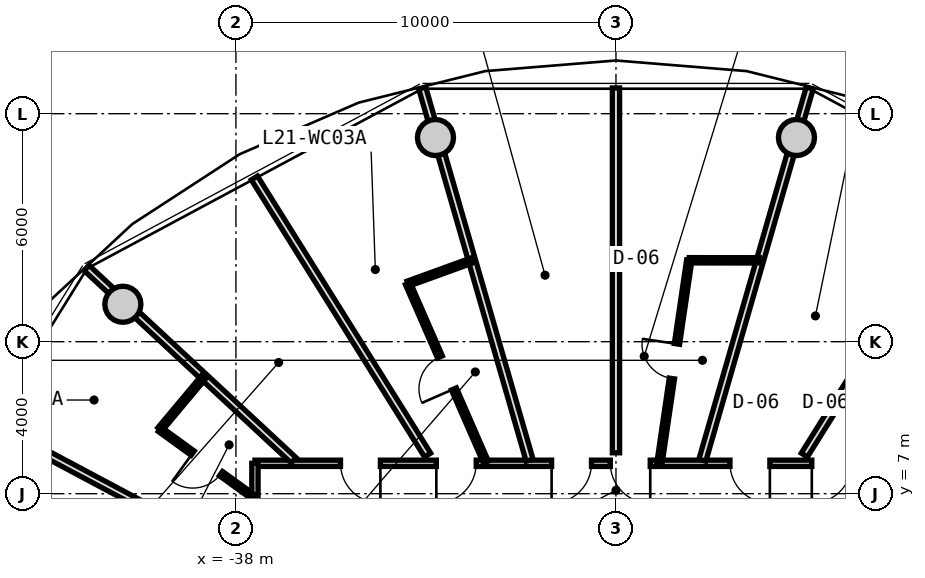
"""IFC4 building model, lengths in metres.
Left out: names, types, materials, properties, quantities, classifications, styles, units other than length and angle.
Written with IfcOpenShell. Run it as: python <this file> out.ifc"""

import sys

from ifc_helpers import new_model, si_unit, direction, frame, frame_2d, origin, origin_2d, place, context, subcontext, project, spatial, rectangle, circle, extrude, source, transform, mapped, element, fill, save


model = new_model("IFC4")
c1 = context("Model", 3, precision=1e-05, world=origin(), true_north=direction((0.0, 1.0)))
c2 = subcontext(c1, "Body", "Model", "MODEL_VIEW")
j1 = project(units=[si_unit("LENGTHUNIT", "METRE"), si_unit("PLANEANGLEUNIT", "RADIAN")], contexts=[c1])
p1 = place(None, origin())
s1 = spatial("IfcSite", under=j1, at=p1, CompositionType="ELEMENT")
p2 = place(p1, origin())
s2 = spatial("IfcBuilding", under=s1, at=p2, CompositionType="ELEMENT")
p3 = place(p2, frame((0.0, 0.0, 70.4)))
s3 = spatial("IfcBuildingStorey", under=s2, at=p3, CompositionType="ELEMENT", Elevation=70.4)
m1 = source(origin(), c2, "Body", "SweptSolid", [
    extrude(circle(Radius=0.475, at=origin_2d()), origin(), (0.0, 0.0, 1.0), 3.05),
])
for number, where, z_axis, x_axis in (
    (1, (-23.251, 16.373, 0.0), (0.0, 0.0, 1.0), (1.0, 0.0, 0.0)),
    (2, (-32.749, 16.373, 0.0), (0.0, 0.0, 1.0), (1.0, 0.0, 0.0)),
    (3, (-40.975, 11.985, 0.0), (0.0, 0.0, 1.0), (1.0, 0.0, 0.0)),
):
    element("IfcColumn", number, at=place(p3, frame(where, z_axis=z_axis, x_axis=x_axis)), inside=s3, PredefinedType="COLUMN", context=c2, shape_type="MappedRepresentation", body=[
        mapped(m1, transform((0.0, 0.0, 0.0), x_axis=(1.0, 0.0, 0.0), y_axis=(0.0, 1.0, 0.0), z_axis=(0.0, 0.0, 1.0), scale=1.0)),
    ])
m2 = source(origin(), c2, "Body", "SweptSolid", [
    extrude(rectangle(XDim=19.0, YDim=0.165, at=frame_2d((9.5, 0.0))), origin(), (0.0, 0.0, 1.0), 2.715),
])
p4 = place(p3, frame((-37.5, 7.8, 0.0), z_axis=(0.0, 0.0, 1.0), x_axis=(1.0, 0.0, 0.0)))
e4 = element("IfcWall", 4, at=p4, inside=s3, PredefinedType="PARTITIONING", context=c2, shape_type="MappedRepresentation", body=[
    mapped(m2, transform((0.0, 0.0, 0.0), x_axis=(1.0, 0.0, 0.0), y_axis=(0.0, 1.0, 0.0), z_axis=(0.0, 0.0, 1.0), scale=1.0)),
])
p5 = place(p4, frame((14.653, 0.0, 0.0)))
e5 = element("IfcOpeningElement", 5, at=p5, cuts=e4, PredefinedType="OPENING", context=c2, shape_type="SweptSolid", body=[
    extrude(rectangle(XDim=1.05, YDim=2.15, at=frame_2d((0.525, 1.075))), frame((0.0, 0.093, 0.0), z_axis=(0.0, -1.0, 0.0), x_axis=(1.0, 0.0, 0.0)), (0.0, 0.0, 1.0), 0.185),
])
p6 = place(p4, frame((12.5, 0.0, 0.0)))
e6 = element("IfcOpeningElement", 6, at=p6, cuts=e4, PredefinedType="OPENING", context=c2, shape_type="SweptSolid", body=[
    extrude(rectangle(XDim=1.05, YDim=2.15, at=frame_2d((0.525, 1.075))), frame((0.0, 0.093, 0.0), z_axis=(0.0, -1.0, 0.0), x_axis=(1.0, 0.0, 0.0)), (0.0, 0.0, 1.0), 0.185),
])
p7 = place(p4, frame((9.352, 0.0, 0.0)))
e7 = element("IfcOpeningElement", 7, at=p7, cuts=e4, PredefinedType="OPENING", context=c2, shape_type="SweptSolid", body=[
    extrude(rectangle(XDim=1.05, YDim=2.15, at=frame_2d((0.525, 1.075))), frame((0.0, 0.093, 0.0), z_axis=(0.0, -1.0, 0.0), x_axis=(1.0, 0.0, 0.0)), (0.0, 0.0, 1.0), 0.185),
])
p8 = place(p4, frame((7.806, 0.0, 0.0)))
e8 = element("IfcOpeningElement", 8, at=p8, cuts=e4, PredefinedType="OPENING", context=c2, shape_type="SweptSolid", body=[
    extrude(rectangle(XDim=1.05, YDim=2.15, at=frame_2d((0.525, 1.075))), frame((0.0, 0.093, 0.0), z_axis=(0.0, -1.0, 0.0), x_axis=(1.0, 0.0, 0.0)), (0.0, 0.0, 1.0), 0.185),
])
p9 = place(p4, frame((4.773, 0.0, 0.0)))
e9 = element("IfcOpeningElement", 9, at=p9, cuts=e4, PredefinedType="OPENING", context=c2, shape_type="SweptSolid", body=[
    extrude(rectangle(XDim=1.05, YDim=2.15, at=frame_2d((0.525, 1.075))), frame((0.0, 0.093, 0.0), z_axis=(0.0, -1.0, 0.0), x_axis=(1.0, 0.0, 0.0)), (0.0, 0.0, 1.0), 0.185),
])
p10 = place(p4, frame((2.251, 0.0, 0.0)))
e10 = element("IfcOpeningElement", 10, at=p10, cuts=e4, PredefinedType="OPENING", context=c2, shape_type="SweptSolid", body=[
    extrude(rectangle(XDim=1.05, YDim=2.15, at=frame_2d((0.525, 1.075))), frame((0.0, 0.093, 0.0), z_axis=(0.0, -1.0, 0.0), x_axis=(1.0, 0.0, 0.0)), (0.0, 0.0, 1.0), 0.185),
])
m3 = source(origin(), c2, "Body", "SweptSolid", [
    extrude(rectangle(XDim=15.6, YDim=0.165, at=frame_2d((7.8, 0.0))), origin(), (0.0, 0.0, 1.0), 2.715),
])
p11 = place(p3, frame((-37.5, -7.8, 0.0), z_axis=(0.0, 0.0, 1.0), x_axis=(0.0, 1.0, 0.0)))
e11 = element("IfcWall", 11, at=p11, inside=s3, PredefinedType="PARTITIONING", context=c2, shape_type="MappedRepresentation", body=[
    mapped(m3, transform((0.0, 0.0, 0.0), x_axis=(1.0, 0.0, 0.0), y_axis=(0.0, 1.0, 0.0), z_axis=(0.0, 0.0, 1.0), scale=1.0)),
])
p12 = place(p11, frame((3.489, 0.0, 0.0)))
e12 = element("IfcOpeningElement", 12, at=p12, cuts=e11, PredefinedType="OPENING", context=c2, shape_type="SweptSolid", body=[
    extrude(rectangle(XDim=1.05, YDim=2.15, at=frame_2d((0.525, 1.075))), frame((0.0, 0.093, 0.0), z_axis=(0.0, -1.0, 0.0), x_axis=(1.0, 0.0, 0.0)), (0.0, 0.0, 1.0), 0.185),
])
p13 = place(p11, frame((0.882, 0.0, 0.0)))
e13 = element("IfcOpeningElement", 13, at=p13, cuts=e11, PredefinedType="OPENING", context=c2, shape_type="SweptSolid", body=[
    extrude(rectangle(XDim=1.05, YDim=2.15, at=frame_2d((0.525, 1.075))), frame((0.0, 0.093, 0.0), z_axis=(0.0, -1.0, 0.0), x_axis=(1.0, 0.0, 0.0)), (0.0, 0.0, 1.0), 0.185),
])
p14 = place(p11, frame((13.293, 0.0, 0.0)))
e14 = element("IfcOpeningElement", 14, at=p14, cuts=e11, PredefinedType="OPENING", context=c2, shape_type="SweptSolid", body=[
    extrude(rectangle(XDim=1.05, YDim=2.15, at=frame_2d((0.525, 1.075))), frame((0.0, 0.093, 0.0), z_axis=(0.0, -1.0, 0.0), x_axis=(1.0, 0.0, 0.0)), (0.0, 0.0, 1.0), 0.185),
])
p15 = place(p11, frame((11.018, 0.0, 0.0)))
e15 = element("IfcOpeningElement", 15, at=p15, cuts=e11, PredefinedType="OPENING", context=c2, shape_type="SweptSolid", body=[
    extrude(rectangle(XDim=1.05, YDim=2.15, at=frame_2d((0.525, 1.075))), frame((0.0, 0.093, 0.0), z_axis=(0.0, -1.0, 0.0), x_axis=(1.0, 0.0, 0.0)), (0.0, 0.0, 1.0), 0.185),
])
p16 = place(p11, frame((8.467, 0.0, 0.0)))
e16 = element("IfcOpeningElement", 16, at=p16, cuts=e11, PredefinedType="OPENING", context=c2, shape_type="SweptSolid", body=[
    extrude(rectangle(XDim=1.05, YDim=2.15, at=frame_2d((0.525, 1.075))), frame((0.0, 0.093, 0.0), z_axis=(0.0, -1.0, 0.0), x_axis=(1.0, 0.0, 0.0)), (0.0, 0.0, 1.0), 0.185),
])
p17 = place(p11, frame((6.035, 0.0, 0.0)))
e17 = element("IfcOpeningElement", 17, at=p17, cuts=e11, PredefinedType="OPENING", context=c2, shape_type="SweptSolid", body=[
    extrude(rectangle(XDim=1.05, YDim=2.15, at=frame_2d((0.525, 1.075))), frame((0.0, 0.093, 0.0), z_axis=(0.0, -1.0, 0.0), x_axis=(1.0, 0.0, 0.0)), (0.0, 0.0, 1.0), 0.185),
])
m4 = source(origin(), c2, "Body", "SweptSolid", [
    extrude(rectangle(XDim=10.196, YDim=0.19, at=frame_2d((5.098, 0.0))), origin(), (0.0, 0.0, 1.0), 2.165),
])
p18 = place(p3, frame((-25.727, 7.88, 0.0), z_axis=(0.0, 0.0, 1.0), x_axis=(0.277136420347, 0.960830580549, 0.0)))
e18 = element("IfcWall", 18, at=p18, inside=s3, PredefinedType="PARTITIONING", context=c2, shape_type="MappedRepresentation", body=[
    mapped(m4, transform((0.0, 0.0, 0.0), x_axis=(1.0, 0.0, 0.0), y_axis=(0.0, 1.0, 0.0), z_axis=(0.0, 0.0, 1.0), scale=1.0)),
])
m5 = source(origin(), c2, "Body", "SweptSolid", [
    extrude(rectangle(XDim=8.598, YDim=0.19, at=frame_2d((4.299, 0.0))), origin(), (0.0, 0.0, 1.0), 2.715),
])
p19 = place(p3, frame((-23.043, 8.017, 0.0), z_axis=(0.0, 0.0, 1.0), x_axis=(0.530039776395, 0.847972779893, 0.0)))
e19 = element("IfcWall", 19, at=p19, inside=s3, PredefinedType="PARTITIONING", context=c2, shape_type="MappedRepresentation", body=[
    mapped(m5, transform((0.0, 0.0, 0.0), x_axis=(1.0, 0.0, 0.0), y_axis=(0.0, 1.0, 0.0), z_axis=(0.0, 0.0, 1.0), scale=1.0)),
])
p20 = place(p3, frame((-30.273, 7.88, 0.0), z_axis=(0.0, 0.0, 1.0), x_axis=(-0.277136420347, 0.960830580549, 0.0)))
e20 = element("IfcWall", 20, at=p20, inside=s3, PredefinedType="PARTITIONING", context=c2, shape_type="MappedRepresentation", body=[
    mapped(m4, transform((0.0, 0.0, 0.0), x_axis=(1.0, 0.0, 0.0), y_axis=(0.0, 1.0, 0.0), z_axis=(0.0, 0.0, 1.0), scale=1.0)),
])
m6 = source(origin(), c2, "Body", "SweptSolid", [
    extrude(rectangle(XDim=9.601, YDim=0.19, at=frame_2d((4.8, 0.0))), origin(), (0.0, 0.0, 1.0), 2.715),
])
p21 = place(p3, frame((-28.0, 8.076, 0.0), z_axis=(0.0, 0.0, 1.0), x_axis=(0.0, 1.0, 0.0)))
e21 = element("IfcWall", 21, at=p21, inside=s3, PredefinedType="PARTITIONING", context=c2, shape_type="MappedRepresentation", body=[
    mapped(m6, transform((0.0, 0.0, 0.0), x_axis=(1.0, 0.0, 0.0), y_axis=(0.0, 1.0, 0.0), z_axis=(0.0, 0.0, 1.0), scale=1.0)),
])
m7 = source(origin(), c2, "Body", "SweptSolid", [
    extrude(rectangle(XDim=5.37, YDim=0.14, at=frame_2d((2.685, 0.0))), origin(), (0.0, 0.0, 1.0), 2.715),
])
p22 = place(p3, frame((-26.851, 7.83, 0.0), z_axis=(0.0, 0.0, 1.0), x_axis=(0.145131397853, 0.989412389935, 0.0)))
e22 = element("IfcWall", 22, at=p22, inside=s3, PredefinedType="PARTITIONING", context=c2, shape_type="MappedRepresentation", body=[
    mapped(m7, transform((0.0, 0.0, 0.0), x_axis=(1.0, 0.0, 0.0), y_axis=(0.0, 1.0, 0.0), z_axis=(0.0, 0.0, 1.0), scale=1.0)),
])
p23 = place(p22, frame((2.225, 0.0, 0.0)))
e23 = element("IfcOpeningElement", 23, at=p23, cuts=e22, PredefinedType="OPENING", context=c2, shape_type="SweptSolid", body=[
    extrude(rectangle(XDim=0.92, YDim=2.1, at=frame_2d((0.46, 1.05))), frame((0.0, 0.08, 0.0), z_axis=(0.0, -1.0, 0.0), x_axis=(1.0, 0.0, 0.0)), (0.0, 0.0, 1.0), 0.16),
])
m8 = source(origin(), c2, "Body", "SweptSolid", [
    extrude(rectangle(XDim=1.843, YDim=0.14, at=frame_2d((0.921, 0.0))), origin(), (0.0, 0.0, 1.0), 2.715),
])
p24 = place(p3, frame((-26.072, 13.143, 0.0), z_axis=(0.0, 0.0, 1.0), x_axis=(0.999998937801, -0.001457531246, 0.0)))
e24 = element("IfcWall", 24, at=p24, inside=s3, PredefinedType="PARTITIONING", context=c2, shape_type="MappedRepresentation", body=[
    mapped(m8, transform((0.0, 0.0, 0.0), x_axis=(1.0, 0.0, 0.0), y_axis=(0.0, 1.0, 0.0), z_axis=(0.0, 0.0, 1.0), scale=1.0)),
])
m9 = source(origin(), c2, "Body", "SweptSolid", [
    extrude(rectangle(XDim=7.435, YDim=0.19, at=frame_2d((3.717, 0.0))), origin(), (0.0, 0.0, 1.0), 2.165),
])
p25 = place(p3, frame((-36.483, 7.88, 0.0), z_axis=(0.0, 0.0, 1.0), x_axis=(-0.732651956848, 0.680603489652, 0.0)))
e25 = element("IfcWall", 25, at=p25, inside=s3, PredefinedType="PARTITIONING", context=c2, shape_type="MappedRepresentation", body=[
    mapped(m9, transform((0.0, 0.0, 0.0), x_axis=(1.0, 0.0, 0.0), y_axis=(0.0, 1.0, 0.0), z_axis=(0.0, 0.0, 1.0), scale=1.0)),
])
p26 = place(p3, frame((-32.957, 8.017, 0.0), z_axis=(0.0, 0.0, 1.0), x_axis=(-0.530039776395, 0.847972779893, 0.0)))
e26 = element("IfcWall", 26, at=p26, inside=s3, PredefinedType="PARTITIONING", context=c2, shape_type="MappedRepresentation", body=[
    mapped(m5, transform((0.0, 0.0, 0.0), x_axis=(1.0, 0.0, 0.0), y_axis=(0.0, 1.0, 0.0), z_axis=(0.0, 0.0, 1.0), scale=1.0)),
])
m10 = source(origin(), c2, "Body", "SweptSolid", [
    extrude(rectangle(XDim=5.126, YDim=0.14, at=frame_2d((2.563, 0.0))), origin(), (0.0, 0.0, 1.0), 2.715),
])
p27 = place(p3, frame((-31.422, 7.83, 0.0), z_axis=(0.0, 0.0, 1.0), x_axis=(-0.400473994842, 0.916308124735, 0.0)))
e27 = element("IfcWall", 27, at=p27, inside=s3, PredefinedType="PARTITIONING", context=c2, shape_type="MappedRepresentation", body=[
    mapped(m10, transform((0.0, 0.0, 0.0), x_axis=(1.0, 0.0, 0.0), y_axis=(0.0, 1.0, 0.0), z_axis=(0.0, 0.0, 1.0), scale=1.0)),
])
p28 = place(p27, frame((2.103, 0.0, 0.0)))
e28 = element("IfcOpeningElement", 28, at=p28, cuts=e27, PredefinedType="OPENING", context=c2, shape_type="SweptSolid", body=[
    extrude(rectangle(XDim=0.92, YDim=2.1, at=frame_2d((0.46, 1.05))), frame((0.0, 0.08, 0.0), z_axis=(0.0, -1.0, 0.0), x_axis=(1.0, 0.0, 0.0)), (0.0, 0.0, 1.0), 0.16),
])
m11 = source(origin(), c2, "Body", "SweptSolid", [
    extrude(rectangle(XDim=1.811, YDim=0.14, at=frame_2d((0.906, 0.0))), origin(), (0.0, 0.0, 1.0), 2.715),
])
p29 = place(p3, frame((-33.475, 12.527, 0.0), z_axis=(0.0, 0.0, 1.0), x_axis=(0.940009682452, 0.341147764021, 0.0)))
e29 = element("IfcWall", 29, at=p29, inside=s3, PredefinedType="PARTITIONING", context=c2, shape_type="MappedRepresentation", body=[
    mapped(m11, transform((0.0, 0.0, 0.0), x_axis=(1.0, 0.0, 0.0), y_axis=(0.0, 1.0, 0.0), z_axis=(0.0, 0.0, 1.0), scale=1.0)),
])
m12 = source(origin(), c2, "Body", "SweptSolid", [
    extrude(rectangle(XDim=7.677, YDim=0.19, at=frame_2d((3.838, 0.0))), origin(), (0.0, 0.0, 1.0), 2.715),
])
p30 = place(p3, frame((-37.703, 5.231, 0.0), z_axis=(0.0, 0.0, 1.0), x_axis=(-0.882725057546, 0.469889851753, 0.0)))
e30 = element("IfcWall", 30, at=p30, inside=s3, PredefinedType="PARTITIONING", context=c2, shape_type="MappedRepresentation", body=[
    mapped(m12, transform((0.0, 0.0, 0.0), x_axis=(1.0, 0.0, 0.0), y_axis=(0.0, 1.0, 0.0), z_axis=(0.0, 0.0, 1.0), scale=1.0)),
])
m13 = source(origin(), c2, "Body", "SweptSolid", [
    extrude(rectangle(XDim=3.051, YDim=0.14, at=frame_2d((1.525, 0.0))), origin(), (0.0, 0.0, 1.0), 2.715),
])
p31 = place(p3, frame((-37.53, 6.903, 0.0), z_axis=(0.0, 0.0, 1.0), x_axis=(-0.809849031404, 0.586638343729, 0.0)))
e31 = element("IfcWall", 31, at=p31, inside=s3, PredefinedType="PARTITIONING", context=c2, shape_type="MappedRepresentation", body=[
    mapped(m13, transform((0.0, 0.0, 0.0), x_axis=(1.0, 0.0, 0.0), y_axis=(0.0, 1.0, 0.0), z_axis=(0.0, 0.0, 1.0), scale=1.0)),
])
p32 = place(p31, frame((1.065, 0.0, 0.0)))
e32 = element("IfcOpeningElement", 32, at=p32, cuts=e31, PredefinedType="OPENING", context=c2, shape_type="SweptSolid", body=[
    extrude(rectangle(XDim=0.92, YDim=2.1, at=frame_2d((0.46, 1.05))), frame((0.0, 0.08, 0.0), z_axis=(0.0, -1.0, 0.0), x_axis=(1.0, 0.0, 0.0)), (0.0, 0.0, 1.0), 0.16),
])
m14 = source(origin(), c2, "Body", "SweptSolid", [
    extrude(rectangle(XDim=1.84, YDim=0.14, at=frame_2d((0.92, 0.0))), origin(), (0.0, 0.0, 1.0), 2.355),
])
p33 = place(p3, frame((-40.0, 8.692, 0.0), z_axis=(0.0, 0.0, 1.0), x_axis=(0.641410397049, 0.767197955262, 0.0)))
e33 = element("IfcWall", 33, at=p33, inside=s3, PredefinedType="PARTITIONING", context=c2, shape_type="MappedRepresentation", body=[
    mapped(m14, transform((0.0, 0.0, 0.0), x_axis=(1.0, 0.0, 0.0), y_axis=(0.0, 1.0, 0.0), z_axis=(0.0, 0.0, 1.0), scale=1.0)),
])
m15 = source(origin(), c2, "Body", "SweptSolid", [
    extrude(rectangle(XDim=1.05, YDim=2.15, at=frame_2d((0.525, 1.075))), frame((0.0, 0.025, 0.0), z_axis=(0.0, -1.0, 0.0), x_axis=(1.0, 0.0, 0.0)), (0.0, 0.0, 1.0), 0.05),
])
p34 = place(p5, frame((1.05, 0.0, 0.0), z_axis=(0.0, 0.0, 1.0), x_axis=(-1.0, 0.0, 0.0)))
e34 = element("IfcDoor", 34, at=p34, inside=s3, OperationType="SINGLE_SWING_RIGHT", PredefinedType="DOOR", context=c2, shape_type="MappedRepresentation", body=[
    mapped(m15, transform((0.0, 0.0, 0.0), x_axis=(1.0, 0.0, 0.0), y_axis=(0.0, 1.0, 0.0), z_axis=(0.0, 0.0, 1.0), scale=1.0)),
])
fill(e5, e34)
p35 = place(p6, frame((1.05, 0.0, 0.0), z_axis=(0.0, 0.0, 1.0), x_axis=(-1.0, 0.0, 0.0)))
e35 = element("IfcDoor", 35, at=p35, inside=s3, OperationType="SINGLE_SWING_LEFT", PredefinedType="DOOR", context=c2, shape_type="MappedRepresentation", body=[
    mapped(m15, transform((0.0, 0.0, 0.0), x_axis=(1.0, 0.0, 0.0), y_axis=(0.0, 1.0, 0.0), z_axis=(0.0, 0.0, 1.0), scale=1.0)),
])
fill(e6, e35)
p36 = place(p7, frame((1.05, 0.0, 0.0), z_axis=(0.0, 0.0, 1.0), x_axis=(-1.0, 0.0, 0.0)))
e36 = element("IfcDoor", 36, at=p36, inside=s3, OperationType="SINGLE_SWING_LEFT", PredefinedType="DOOR", context=c2, shape_type="MappedRepresentation", body=[
    mapped(m15, transform((0.0, 0.0, 0.0), x_axis=(1.0, 0.0, 0.0), y_axis=(0.0, 1.0, 0.0), z_axis=(0.0, 0.0, 1.0), scale=1.0)),
])
fill(e7, e36)
m16 = source(origin(), c2, "Body", "SweptSolid", [
    extrude(rectangle(XDim=0.92, YDim=2.1, at=frame_2d((0.46, 1.05))), frame((0.0, 0.025, 0.0), z_axis=(0.0, -1.0, 0.0), x_axis=(1.0, 0.0, 0.0)), (0.0, 0.0, 1.0), 0.05),
])
p37 = place(p23, origin())
e37 = element("IfcDoor", 37, at=p37, inside=s3, OperationType="SINGLE_SWING_RIGHT", PredefinedType="DOOR", context=c2, shape_type="MappedRepresentation", body=[
    mapped(m16, transform((0.0, 0.0, 0.0), x_axis=(1.0, 0.0, 0.0), y_axis=(0.0, 1.0, 0.0), z_axis=(0.0, 0.0, 1.0), scale=1.0)),
])
fill(e23, e37)
p38 = place(p8, frame((1.05, 0.0, 0.0), z_axis=(0.0, 0.0, 1.0), x_axis=(-1.0, 0.0, 0.0)))
e38 = element("IfcDoor", 38, at=p38, inside=s3, OperationType="SINGLE_SWING_RIGHT", PredefinedType="DOOR", context=c2, shape_type="MappedRepresentation", body=[
    mapped(m15, transform((0.0, 0.0, 0.0), x_axis=(1.0, 0.0, 0.0), y_axis=(0.0, 1.0, 0.0), z_axis=(0.0, 0.0, 1.0), scale=1.0)),
])
fill(e8, e38)
p39 = place(p9, frame((1.05, 0.0, 0.0), z_axis=(0.0, 0.0, 1.0), x_axis=(-1.0, 0.0, 0.0)))
e39 = element("IfcDoor", 39, at=p39, inside=s3, OperationType="SINGLE_SWING_RIGHT", PredefinedType="DOOR", context=c2, shape_type="MappedRepresentation", body=[
    mapped(m15, transform((0.0, 0.0, 0.0), x_axis=(1.0, 0.0, 0.0), y_axis=(0.0, 1.0, 0.0), z_axis=(0.0, 0.0, 1.0), scale=1.0)),
])
fill(e9, e39)
p40 = place(p28, origin())
e40 = element("IfcDoor", 40, at=p40, inside=s3, OperationType="SINGLE_SWING_LEFT", PredefinedType="DOOR", context=c2, shape_type="MappedRepresentation", body=[
    mapped(m16, transform((0.0, 0.0, 0.0), x_axis=(1.0, 0.0, 0.0), y_axis=(0.0, 1.0, 0.0), z_axis=(0.0, 0.0, 1.0), scale=1.0)),
])
fill(e28, e40)
p41 = place(p10, frame((1.05, 0.0, 0.0), z_axis=(0.0, 0.0, 1.0), x_axis=(-1.0, 0.0, 0.0)))
e41 = element("IfcDoor", 41, at=p41, inside=s3, OperationType="SINGLE_SWING_LEFT", PredefinedType="DOOR", context=c2, shape_type="MappedRepresentation", body=[
    mapped(m15, transform((0.0, 0.0, 0.0), x_axis=(1.0, 0.0, 0.0), y_axis=(0.0, 1.0, 0.0), z_axis=(0.0, 0.0, 1.0), scale=1.0)),
])
fill(e10, e41)
p42 = place(p32, origin())
e42 = element("IfcDoor", 42, at=p42, inside=s3, OperationType="SINGLE_SWING_RIGHT", PredefinedType="DOOR", context=c2, shape_type="MappedRepresentation", body=[
    mapped(m16, transform((0.0, 0.0, 0.0), x_axis=(1.0, 0.0, 0.0), y_axis=(0.0, 1.0, 0.0), z_axis=(0.0, 0.0, 1.0), scale=1.0)),
])
fill(e32, e42)
save(model, sys.argv[1])
